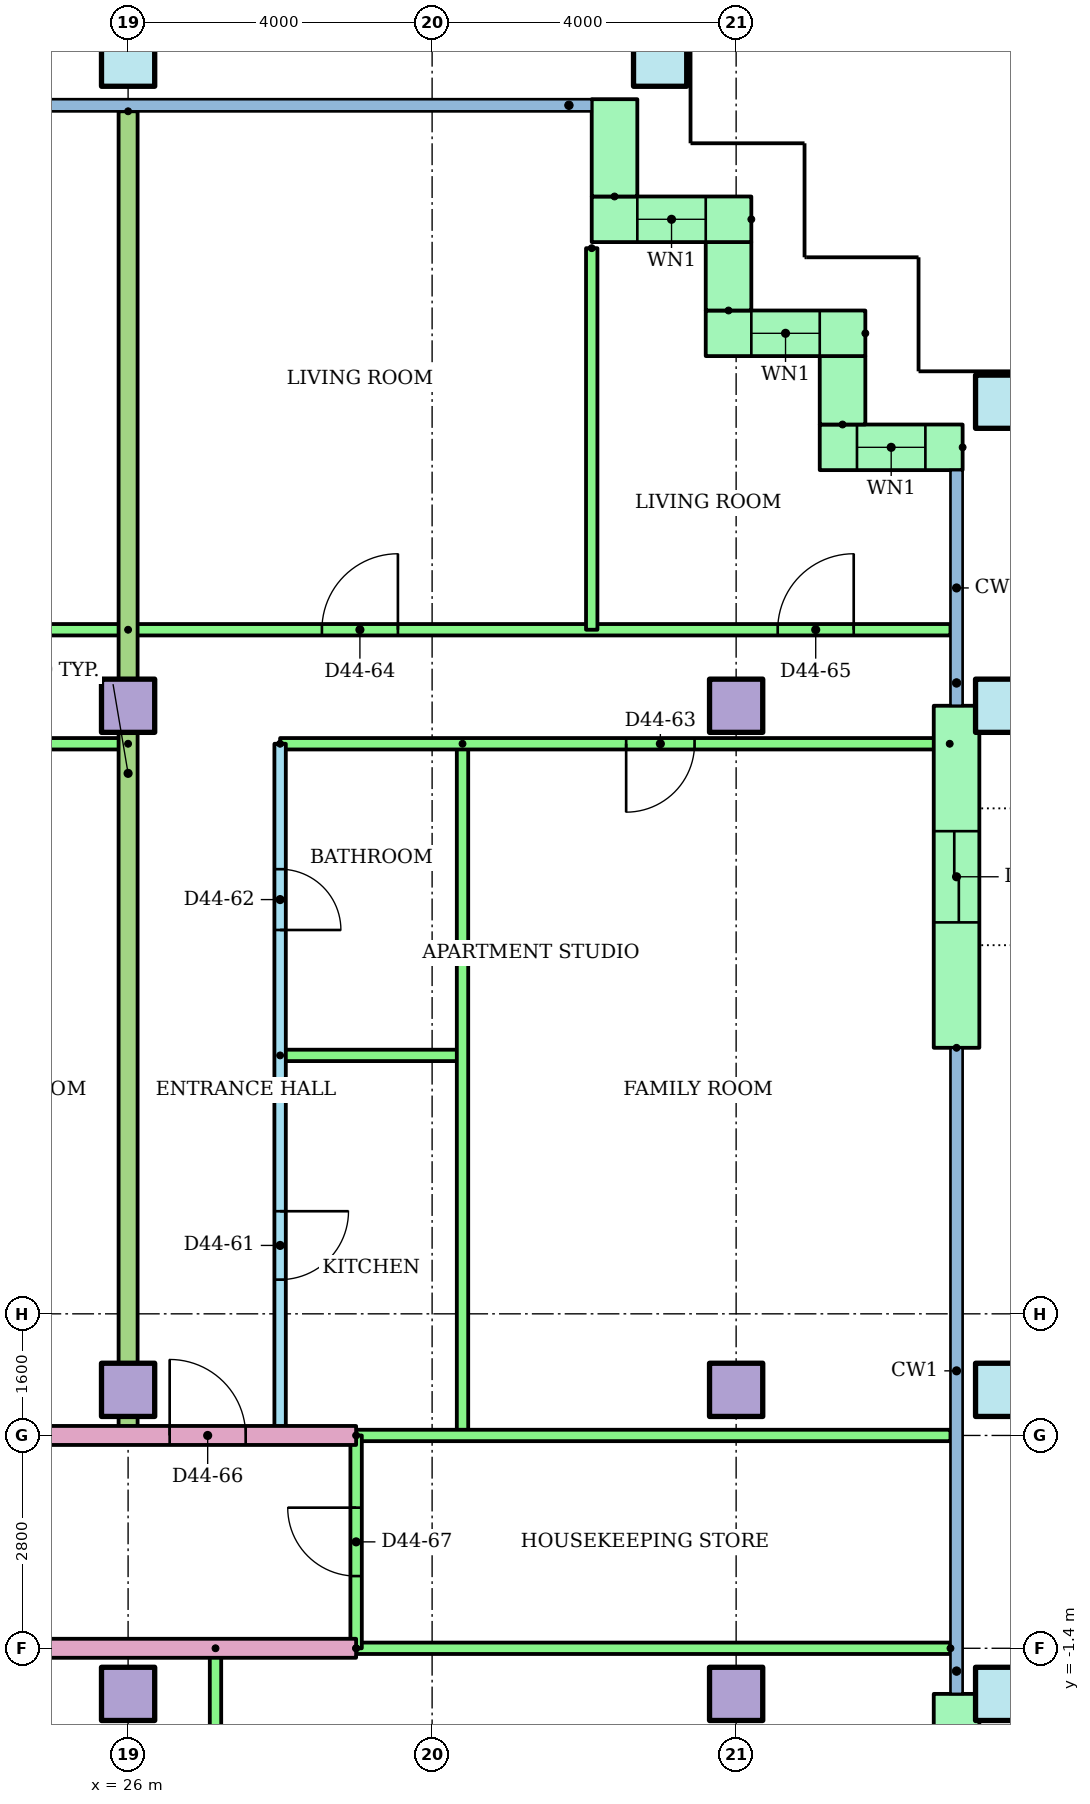
"""IFC4 building model, lengths in metres.
Left out: names, types, materials, properties, quantities, classifications, styles, units other than length and angle.
Written with IfcOpenShell. Run it as: python <this file> out.ifc"""

import sys

from ifc_helpers import new_model, si_unit, direction, frame, frame_2d, origin, origin_2d, place, context, subcontext, project, spatial, rectangle, hollow_rectangle, extrude, element, fill, save


model = new_model("IFC4")
c1 = context("Model", 3, precision=1e-05, world=origin(), true_north=direction((0.0, 1.0)))
c2 = subcontext(c1, "Body", "Model", "MODEL_VIEW")
j1 = project(units=[si_unit("LENGTHUNIT", "METRE"), si_unit("PLANEANGLEUNIT", "RADIAN")], contexts=[c1])
p1 = place(None, origin())
s1 = spatial("IfcSite", under=j1, at=p1, CompositionType="ELEMENT")
p2 = place(p1, origin())
s2 = spatial("IfcBuilding", under=s1, at=p2, CompositionType="ELEMENT")
p3 = place(p2, frame((0.0, 0.0, 171.7)))
s3 = spatial("IfcBuildingStorey", under=s2, at=p3, CompositionType="ELEMENT", Elevation=171.7)
for number, where in (
    (1, (26.0, -2.0, 0.0)),
    (2, (34.0, -2.0, 0.0)),
):
    element("IfcColumn", number, at=place(p3, frame(where)), inside=s3, PredefinedType="COLUMN", context=c2, shape_type="SweptSolid", body=[
        extrude(rectangle(XDim=0.7, YDim=0.7, at=origin_2d()), origin(), (0.0, 0.0, 1.0), 3.2),
    ])
p4 = place(p3, frame((37.5, -2.0, 0.0)))
e3 = element("IfcColumn", 3, at=p4, inside=s3, PredefinedType="COLUMN", context=c2, shape_type="SweptSolid", body=[
    extrude(hollow_rectangle(XDim=0.7, YDim=0.7, WallThickness=0.036, at=origin_2d()), origin(), (0.0, 0.0, 1.0), 3.2),
])
for number, where in (
    (4, (26.0, 2.0, 0.0)),
    (5, (34.0, 2.0, 0.0)),
):
    element("IfcColumn", number, at=place(p3, frame(where)), inside=s3, PredefinedType="COLUMN", context=c2, shape_type="SweptSolid", body=[
        extrude(rectangle(XDim=0.7, YDim=0.7, at=origin_2d()), origin(), (0.0, 0.0, 1.0), 3.2),
    ])
p5 = place(p3, frame((37.5, 2.0, 0.0)))
e6 = element("IfcColumn", 6, at=p5, inside=s3, PredefinedType="COLUMN", context=c2, shape_type="SweptSolid", body=[
    extrude(hollow_rectangle(XDim=0.7, YDim=0.7, WallThickness=0.036, at=origin_2d()), origin(), (0.0, 0.0, 1.0), 3.2),
])
for number, where in (
    (7, (26.0, 11.0, 0.0)),
    (8, (34.0, 11.0, 0.0)),
):
    element("IfcColumn", number, at=place(p3, frame(where)), inside=s3, PredefinedType="COLUMN", context=c2, shape_type="SweptSolid", body=[
        extrude(rectangle(XDim=0.7, YDim=0.7, at=origin_2d()), origin(), (0.0, 0.0, 1.0), 3.2),
    ])
for number, where in (
    (9, (37.5, 11.0, 0.0)),
    (10, (37.5, 15.0, 0.0)),
    (11, (26.0, 19.5, 0.0)),
    (12, (33.0, 19.5, 0.0)),
):
    element("IfcColumn", number, at=place(p3, frame(where)), inside=s3, PredefinedType="COLUMN", context=c2, shape_type="SweptSolid", body=[
        extrude(hollow_rectangle(XDim=0.7, YDim=0.7, WallThickness=0.036, at=origin_2d()), origin(), (0.0, 0.0, 1.0), 3.2),
    ])
p6 = place(p3, frame((36.98, 14.4, 0.0), z_axis=(0.0, 0.0, 1.0), x_axis=(-1.0, 0.0, 0.0)))
e13 = element("IfcWall", 13, at=p6, inside=s3, PredefinedType="STANDARD", context=c2, shape_type="SweptSolid", body=[
    extrude(rectangle(XDim=1.88, YDim=0.6, at=frame_2d((0.94, 0.0))), origin(), (0.0, 0.0, 1.0), 2.92),
])
p7 = place(p6, frame((0.49, 0.0, 0.9)))
e14 = element("IfcOpeningElement", 14, at=p7, cuts=e13, PredefinedType="OPENING", context=c2, shape_type="SweptSolid", body=[
    extrude(rectangle(XDim=0.9, YDim=1.5, at=frame_2d((0.45, 0.75))), frame((0.0, 0.31, 0.0), z_axis=(0.0, -1.0, 0.0), x_axis=(1.0, 0.0, 0.0)), (0.0, 0.0, 1.0), 0.62),
])
p8 = place(p3, frame((35.4, 14.7, 0.0), z_axis=(0.0, 0.0, 1.0), x_axis=(0.0, 1.0, 0.0)))
e15 = element("IfcWall", 15, at=p8, inside=s3, PredefinedType="STANDARD", context=c2, shape_type="SweptSolid", body=[
    extrude(rectangle(XDim=0.9, YDim=0.6, at=frame_2d((0.45, 0.0))), origin(), (0.0, 0.0, 1.0), 2.92),
])
p9 = place(p3, frame((35.7, 15.9, 0.0), z_axis=(0.0, 0.0, 1.0), x_axis=(-1.0, 0.0, 0.0)))
e16 = element("IfcWall", 16, at=p9, inside=s3, PredefinedType="STANDARD", context=c2, shape_type="SweptSolid", body=[
    extrude(rectangle(XDim=2.1, YDim=0.6, at=frame_2d((1.05, 0.0))), origin(), (0.0, 0.0, 1.0), 2.92),
])
p10 = place(p9, frame((0.6, 0.0, 0.9)))
e17 = element("IfcOpeningElement", 17, at=p10, cuts=e16, PredefinedType="OPENING", context=c2, shape_type="SweptSolid", body=[
    extrude(rectangle(XDim=0.9, YDim=1.5, at=frame_2d((0.45, 0.75))), frame((0.0, 0.31, 0.0), z_axis=(0.0, -1.0, 0.0), x_axis=(1.0, 0.0, 0.0)), (0.0, 0.0, 1.0), 0.62),
])
p11 = place(p3, frame((33.9, 16.2, 0.0), z_axis=(0.0, 0.0, 1.0), x_axis=(0.0, 1.0, 0.0)))
e18 = element("IfcWall", 18, at=p11, inside=s3, PredefinedType="STANDARD", context=c2, shape_type="SweptSolid", body=[
    extrude(rectangle(XDim=0.9, YDim=0.6, at=frame_2d((0.45, 0.0))), origin(), (0.0, 0.0, 1.0), 2.92),
])
p12 = place(p3, frame((34.2, 17.4, 0.0), z_axis=(0.0, 0.0, 1.0), x_axis=(-1.0, 0.0, 0.0)))
e19 = element("IfcWall", 19, at=p12, inside=s3, PredefinedType="STANDARD", context=c2, shape_type="SweptSolid", body=[
    extrude(rectangle(XDim=2.1, YDim=0.6, at=frame_2d((1.05, 0.0))), origin(), (0.0, 0.0, 1.0), 2.92),
])
p13 = place(p12, frame((0.6, 0.0, 0.9)))
e20 = element("IfcOpeningElement", 20, at=p13, cuts=e19, PredefinedType="OPENING", context=c2, shape_type="SweptSolid", body=[
    extrude(rectangle(XDim=0.9, YDim=1.5, at=frame_2d((0.45, 0.75))), frame((0.0, 0.31, 0.0), z_axis=(0.0, -1.0, 0.0), x_axis=(1.0, 0.0, 0.0)), (0.0, 0.0, 1.0), 0.62),
])
p14 = place(p3, frame((32.4, 17.7, 0.0), z_axis=(0.0, 0.0, 1.0), x_axis=(0.0, 1.0, 0.0)))
e21 = element("IfcWall", 21, at=p14, inside=s3, PredefinedType="STANDARD", context=c2, shape_type="SweptSolid", body=[
    extrude(rectangle(XDim=1.28, YDim=0.6, at=frame_2d((0.64, 0.0))), origin(), (0.0, 0.0, 1.0), 2.92),
])
p15 = place(p3, frame((36.9, -5.7, 0.0), z_axis=(0.0, 0.0, 1.0), x_axis=(0.0, 1.0, 0.0)))
e22 = element("IfcWall", 22, at=p15, inside=s3, PredefinedType="STANDARD", context=c2, shape_type="SweptSolid", body=[
    extrude(rectangle(XDim=3.7, YDim=0.6, at=frame_2d((1.85, 0.0))), origin(), (0.0, 0.0, 1.0), 2.92),
])
p16 = place(p15, frame((1.25, 0.0, 0.0)))
e23 = element("IfcOpeningElement", 23, at=p16, cuts=e22, PredefinedType="OPENING", context=c2, shape_type="SweptSolid", body=[
    extrude(rectangle(XDim=1.2, YDim=2.1, at=frame_2d((0.6, 1.05))), frame((0.0, 0.31, 0.0), z_axis=(0.0, -1.0, 0.0), x_axis=(1.0, 0.0, 0.0)), (0.0, 0.0, 1.0), 0.62),
])
p17 = place(p3, frame((36.9, 6.5, 0.0), z_axis=(0.0, 0.0, 1.0), x_axis=(0.0, 1.0, 0.0)))
e24 = element("IfcWall", 24, at=p17, inside=s3, PredefinedType="STANDARD", context=c2, shape_type="SweptSolid", body=[
    extrude(rectangle(XDim=4.5, YDim=0.6, at=frame_2d((2.25, 0.0))), origin(), (0.0, 0.0, 1.0), 2.92),
])
p18 = place(p17, frame((1.65, 0.0, 0.0)))
e25 = element("IfcOpeningElement", 25, at=p18, cuts=e24, PredefinedType="OPENING", context=c2, shape_type="SweptSolid", body=[
    extrude(rectangle(XDim=1.2, YDim=2.1, at=frame_2d((0.6, 1.05))), frame((0.0, 0.31, 0.0), z_axis=(0.0, -1.0, 0.0), x_axis=(1.0, 0.0, 0.0)), (0.0, 0.0, 1.0), 0.62),
])
p19 = place(p3, frame((27.15, -1.4, 0.0), z_axis=(0.0, 0.0, 1.0), x_axis=(0.0, -1.0, 0.0)))
e26 = element("IfcWall", 26, at=p19, inside=s3, PredefinedType="PARTITIONING", context=c2, shape_type="SweptSolid", body=[
    extrude(rectangle(XDim=6.7, YDim=0.15, at=frame_2d((3.35, 0.0))), origin(), (0.0, 0.0, 1.0), 2.4),
])
p20 = place(p3, frame((29.0, -1.4, 0.0), z_axis=(0.0, 0.0, 1.0), x_axis=(-1.0, 0.0, 0.0)))
e27 = element("IfcWall", 27, at=p20, inside=s3, PredefinedType="PARTITIONING", context=c2, shape_type="SweptSolid", body=[
    extrude(rectangle(XDim=15.0, YDim=0.25, at=frame_2d((7.5, 0.0))), origin(), (0.0, 0.0, 1.0), 2.4),
])
p21 = place(p3, frame((36.82, -1.4, 0.0), z_axis=(0.0, 0.0, 1.0), x_axis=(-1.0, 0.0, 0.0)))
e28 = element("IfcWall", 28, at=p21, inside=s3, PredefinedType="PARTITIONING", context=c2, shape_type="SweptSolid", body=[
    extrude(rectangle(XDim=7.82, YDim=0.15, at=frame_2d((3.91, 0.0))), origin(), (0.0, 0.0, 1.0), 2.4),
])
p22 = place(p3, frame((26.0, 10.5, 0.0), z_axis=(0.0, 0.0, 1.0), x_axis=(-1.0, 0.0, 0.0)))
e29 = element("IfcWall", 29, at=p22, inside=s3, PredefinedType="PARTITIONING", context=c2, shape_type="SweptSolid", body=[
    extrude(rectangle(XDim=10.0, YDim=0.15, at=frame_2d((5.0, 0.0))), origin(), (0.0, 0.0, 1.0), 2.4),
])
p23 = place(p22, frame((4.9, 0.0, 0.0)))
e30 = element("IfcOpeningElement", 30, at=p23, cuts=e29, PredefinedType="OPENING", context=c2, shape_type="SweptSolid", body=[
    extrude(rectangle(XDim=0.9, YDim=2.1, at=frame_2d((0.45, 1.05))), frame((0.0, 0.085, 0.0), z_axis=(0.0, -1.0, 0.0), x_axis=(1.0, 0.0, 0.0)), (0.0, 0.0, 1.0), 0.17),
])
p24 = place(p22, frame((1.1, 0.0, 0.0)))
e31 = element("IfcOpeningElement", 31, at=p24, cuts=e29, PredefinedType="OPENING", context=c2, shape_type="SweptSolid", body=[
    extrude(rectangle(XDim=0.9, YDim=2.1, at=frame_2d((0.45, 1.05))), frame((0.0, 0.085, 0.0), z_axis=(0.0, -1.0, 0.0), x_axis=(1.0, 0.0, 0.0)), (0.0, 0.0, 1.0), 0.17),
])
p25 = place(p3, frame((14.0, 12.0, 0.0)))
e32 = element("IfcWall", 32, at=p25, inside=s3, PredefinedType="PARTITIONING", context=c2, shape_type="SweptSolid", body=[
    extrude(rectangle(XDim=12.0, YDim=0.15, at=frame_2d((6.0, 0.0))), origin(), (0.0, 0.0, 1.0), 2.4),
])
p26 = place(p25, frame((1.5, 0.0, 0.0)))
e33 = element("IfcOpeningElement", 33, at=p26, cuts=e32, PredefinedType="OPENING", context=c2, shape_type="SweptSolid", body=[
    extrude(rectangle(XDim=1.0, YDim=2.1, at=frame_2d((0.5, 1.05))), frame((0.0, 0.085, 0.0), z_axis=(0.0, -1.0, 0.0), x_axis=(1.0, 0.0, 0.0)), (0.0, 0.0, 1.0), 0.17),
])
p27 = place(p25, frame((7.55, 0.0, 0.0)))
e34 = element("IfcOpeningElement", 34, at=p27, cuts=e32, PredefinedType="OPENING", context=c2, shape_type="SweptSolid", body=[
    extrude(rectangle(XDim=0.9, YDim=2.1, at=frame_2d((0.45, 1.05))), frame((0.0, 0.085, 0.0), z_axis=(0.0, -1.0, 0.0), x_axis=(1.0, 0.0, 0.0)), (0.0, 0.0, 1.0), 0.17),
])
p28 = place(p3, frame((28.0, 10.5, 0.0), z_axis=(0.0, 0.0, 1.0), x_axis=(0.0, -1.0, 0.0)))
e35 = element("IfcWall", 35, at=p28, inside=s3, PredefinedType="PARTITIONING", context=c2, shape_type="SweptSolid", body=[
    extrude(rectangle(XDim=9.1, YDim=0.15, at=frame_2d((4.55, 0.0))), origin(), (0.0, 0.0, 1.0), 2.4),
])
p29 = place(p28, frame((6.15, 0.0, 0.0)))
e36 = element("IfcOpeningElement", 36, at=p29, cuts=e35, PredefinedType="OPENING", context=c2, shape_type="SweptSolid", body=[
    extrude(rectangle(XDim=0.9, YDim=2.1, at=frame_2d((0.45, 1.05))), frame((0.0, 0.085, 0.0), z_axis=(0.0, -1.0, 0.0), x_axis=(1.0, 0.0, 0.0)), (0.0, 0.0, 1.0), 0.17),
])
p30 = place(p28, frame((1.65, 0.0, 0.0)))
e37 = element("IfcOpeningElement", 37, at=p30, cuts=e35, PredefinedType="OPENING", context=c2, shape_type="SweptSolid", body=[
    extrude(rectangle(XDim=0.8, YDim=2.1, at=frame_2d((0.4, 1.05))), frame((0.0, 0.085, 0.0), z_axis=(0.0, -1.0, 0.0), x_axis=(1.0, 0.0, 0.0)), (0.0, 0.0, 1.0), 0.17),
])
p31 = place(p3, frame((28.0, 6.4, 0.0)))
e38 = element("IfcWall", 38, at=p31, inside=s3, PredefinedType="PARTITIONING", context=c2, shape_type="SweptSolid", body=[
    extrude(rectangle(XDim=2.4, YDim=0.15, at=frame_2d((1.2, 0.0))), origin(), (0.0, 0.0, 1.0), 2.4),
])
p32 = place(p3, frame((30.4, 10.5, 0.0), z_axis=(0.0, 0.0, 1.0), x_axis=(0.0, -1.0, 0.0)))
e39 = element("IfcWall", 39, at=p32, inside=s3, PredefinedType="PARTITIONING", context=c2, shape_type="SweptSolid", body=[
    extrude(rectangle(XDim=9.1, YDim=0.15, at=frame_2d((4.55, 0.0))), origin(), (0.0, 0.0, 1.0), 2.4),
])
p33 = place(p3, frame((36.81, 10.5, 0.0), z_axis=(0.0, 0.0, 1.0), x_axis=(-1.0, 0.0, 0.0)))
e40 = element("IfcWall", 40, at=p33, inside=s3, PredefinedType="PARTITIONING", context=c2, shape_type="SweptSolid", body=[
    extrude(rectangle(XDim=8.81, YDim=0.15, at=frame_2d((4.405, 0.0))), origin(), (0.0, 0.0, 1.0), 2.4),
])
p34 = place(p33, frame((3.357, 0.0, 0.0)))
e41 = element("IfcOpeningElement", 41, at=p34, cuts=e40, PredefinedType="OPENING", context=c2, shape_type="SweptSolid", body=[
    extrude(rectangle(XDim=0.9, YDim=2.1, at=frame_2d((0.45, 1.05))), frame((0.0, 0.085, 0.0), z_axis=(0.0, -1.0, 0.0), x_axis=(1.0, 0.0, 0.0)), (0.0, 0.0, 1.0), 0.17),
])
p35 = place(p3, frame((26.0, 12.0, 0.0)))
e42 = element("IfcWall", 42, at=p35, inside=s3, PredefinedType="PARTITIONING", context=c2, shape_type="SweptSolid", body=[
    extrude(rectangle(XDim=10.82, YDim=0.15, at=frame_2d((5.41, 0.0))), origin(), (0.0, 0.0, 1.0), 2.4),
])
p36 = place(p35, frame((2.55, 0.0, 0.0)))
e43 = element("IfcOpeningElement", 43, at=p36, cuts=e42, PredefinedType="OPENING", context=c2, shape_type="SweptSolid", body=[
    extrude(rectangle(XDim=1.0, YDim=2.1, at=frame_2d((0.5, 1.05))), frame((0.0, 0.085, 0.0), z_axis=(0.0, -1.0, 0.0), x_axis=(1.0, 0.0, 0.0)), (0.0, 0.0, 1.0), 0.17),
])
p37 = place(p35, frame((8.547, 0.0, 0.0)))
e44 = element("IfcOpeningElement", 44, at=p37, cuts=e42, PredefinedType="OPENING", context=c2, shape_type="SweptSolid", body=[
    extrude(rectangle(XDim=1.0, YDim=2.1, at=frame_2d((0.5, 1.05))), frame((0.0, 0.085, 0.0), z_axis=(0.0, -1.0, 0.0), x_axis=(1.0, 0.0, 0.0)), (0.0, 0.0, 1.0), 0.17),
])
p38 = place(p3, frame((32.1, 17.02, 0.0), z_axis=(0.0, 0.0, 1.0), x_axis=(0.0, -1.0, 0.0)))
e45 = element("IfcWall", 45, at=p38, inside=s3, PredefinedType="PARTITIONING", context=c2, shape_type="SweptSolid", body=[
    extrude(rectangle(XDim=5.02, YDim=0.15, at=frame_2d((2.51, 0.0))), origin(), (0.0, 0.0, 1.0), 2.4),
])
p39 = place(p3, frame((26.0, 18.821, 0.0), z_axis=(0.0, 0.0, 1.0), x_axis=(0.0, -1.0, 0.0)))
e46 = element("IfcWall", 46, at=p39, inside=s3, PredefinedType="PARTITIONING", context=c2, shape_type="SweptSolid", body=[
    extrude(rectangle(XDim=17.421, YDim=0.25, at=frame_2d((8.71, 0.0))), origin(), (0.0, 0.0, 1.0), 2.4),
])
p40 = place(p3, frame((14.0, 1.4, 0.0)))
e47 = element("IfcWall", 47, at=p40, inside=s3, PredefinedType="PARTITIONING", context=c2, shape_type="SweptSolid", body=[
    extrude(rectangle(XDim=15.0, YDim=0.25, at=frame_2d((7.5, 0.0))), origin(), (0.0, 0.0, 1.0), 2.4),
])
p41 = place(p40, frame((0.5, 0.0, 0.0)))
e48 = element("IfcOpeningElement", 48, at=p41, cuts=e47, PredefinedType="OPENING", context=c2, shape_type="SweptSolid", body=[
    extrude(rectangle(XDim=1.0, YDim=2.1, at=frame_2d((0.5, 1.05))), frame((0.0, 0.135, 0.0), z_axis=(0.0, -1.0, 0.0), x_axis=(1.0, 0.0, 0.0)), (0.0, 0.0, 1.0), 0.27),
])
p42 = place(p40, frame((12.547, 0.0, 0.0)))
e49 = element("IfcOpeningElement", 49, at=p42, cuts=e47, PredefinedType="OPENING", context=c2, shape_type="SweptSolid", body=[
    extrude(rectangle(XDim=1.0, YDim=2.1, at=frame_2d((0.5, 1.05))), frame((0.0, 0.135, 0.0), z_axis=(0.0, -1.0, 0.0), x_axis=(1.0, 0.0, 0.0)), (0.0, 0.0, 1.0), 0.27),
])
p43 = place(p3, frame((29.0, 1.4, 0.0)))
e50 = element("IfcWall", 50, at=p43, inside=s3, PredefinedType="PARTITIONING", context=c2, shape_type="SweptSolid", body=[
    extrude(rectangle(XDim=7.82, YDim=0.15, at=frame_2d((3.91, 0.0))), origin(), (0.0, 0.0, 1.0), 2.4),
])
p44 = place(p3, frame((29.0, -1.4, 0.0), z_axis=(0.0, 0.0, 1.0), x_axis=(0.0, 1.0, 0.0)))
e51 = element("IfcWall", 51, at=p44, inside=s3, PredefinedType="PARTITIONING", context=c2, shape_type="SweptSolid", body=[
    extrude(rectangle(XDim=2.8, YDim=0.15, at=frame_2d((1.4, 0.0))), origin(), (0.0, 0.0, 1.0), 2.4),
])
p45 = place(p44, frame((0.95, 0.0, 0.0)))
e52 = element("IfcOpeningElement", 52, at=p45, cuts=e51, PredefinedType="OPENING", context=c2, shape_type="SweptSolid", body=[
    extrude(rectangle(XDim=0.9, YDim=2.1, at=frame_2d((0.45, 1.05))), frame((0.0, 0.085, 0.0), z_axis=(0.0, -1.0, 0.0), x_axis=(1.0, 0.0, 0.0)), (0.0, 0.0, 1.0), 0.17),
])
p46 = place(p7, origin())
e53 = element("IfcWindow", 53, at=p46, inside=s3, PartitioningType="SINGLE_PANEL", PredefinedType="WINDOW", context=c2, shape_type="SweptSolid", body=[
    extrude(rectangle(XDim=0.9, YDim=1.5, at=frame_2d((0.45, 0.75))), frame((0.0, 0.03, 0.0), z_axis=(0.0, -1.0, 0.0), x_axis=(1.0, 0.0, 0.0)), (0.0, 0.0, 1.0), 0.06),
])
fill(e14, e53)
p47 = place(p10, origin())
e54 = element("IfcWindow", 54, at=p47, inside=s3, PartitioningType="SINGLE_PANEL", PredefinedType="WINDOW", context=c2, shape_type="SweptSolid", body=[
    extrude(rectangle(XDim=0.9, YDim=1.5, at=frame_2d((0.45, 0.75))), frame((0.0, 0.03, 0.0), z_axis=(0.0, -1.0, 0.0), x_axis=(1.0, 0.0, 0.0)), (0.0, 0.0, 1.0), 0.06),
])
fill(e17, e54)
p48 = place(p13, origin())
e55 = element("IfcWindow", 55, at=p48, inside=s3, PartitioningType="SINGLE_PANEL", PredefinedType="WINDOW", context=c2, shape_type="SweptSolid", body=[
    extrude(rectangle(XDim=0.9, YDim=1.5, at=frame_2d((0.45, 0.75))), frame((0.0, 0.03, 0.0), z_axis=(0.0, -1.0, 0.0), x_axis=(1.0, 0.0, 0.0)), (0.0, 0.0, 1.0), 0.06),
])
fill(e20, e55)
p49 = place(p29, origin())
e56 = element("IfcDoor", 56, at=p49, inside=s3, OperationType="SINGLE_SWING_LEFT", PredefinedType="DOOR", context=c2, shape_type="SweptSolid", body=[
    extrude(rectangle(XDim=0.9, YDim=2.1, at=frame_2d((0.45, 1.05))), frame((0.0, 0.025, 0.0), z_axis=(0.0, -1.0, 0.0), x_axis=(1.0, 0.0, 0.0)), (0.0, 0.0, 1.0), 0.05),
])
fill(e36, e56)
p50 = place(p30, origin())
e57 = element("IfcDoor", 57, at=p50, inside=s3, OperationType="SINGLE_SWING_RIGHT", PredefinedType="DOOR", context=c2, shape_type="SweptSolid", body=[
    extrude(rectangle(XDim=0.8, YDim=2.1, at=frame_2d((0.4, 1.05))), frame((0.0, 0.025, 0.0), z_axis=(0.0, -1.0, 0.0), x_axis=(1.0, 0.0, 0.0)), (0.0, 0.0, 1.0), 0.05),
])
fill(e37, e57)
p51 = place(p34, origin())
e58 = element("IfcDoor", 58, at=p51, inside=s3, OperationType="SINGLE_SWING_RIGHT", PredefinedType="DOOR", context=c2, shape_type="SweptSolid", body=[
    extrude(rectangle(XDim=0.9, YDim=2.1, at=frame_2d((0.45, 1.05))), frame((0.0, 0.025, 0.0), z_axis=(0.0, -1.0, 0.0), x_axis=(1.0, 0.0, 0.0)), (0.0, 0.0, 1.0), 0.05),
])
fill(e41, e58)
p52 = place(p36, origin())
e59 = element("IfcDoor", 59, at=p52, inside=s3, OperationType="SINGLE_SWING_RIGHT", PredefinedType="DOOR", context=c2, shape_type="SweptSolid", body=[
    extrude(rectangle(XDim=1.0, YDim=2.1, at=frame_2d((0.5, 1.05))), frame((0.0, 0.025, 0.0), z_axis=(0.0, -1.0, 0.0), x_axis=(1.0, 0.0, 0.0)), (0.0, 0.0, 1.0), 0.05),
])
fill(e43, e59)
p53 = place(p37, origin())
e60 = element("IfcDoor", 60, at=p53, inside=s3, OperationType="SINGLE_SWING_RIGHT", PredefinedType="DOOR", context=c2, shape_type="SweptSolid", body=[
    extrude(rectangle(XDim=1.0, YDim=2.1, at=frame_2d((0.5, 1.05))), frame((0.0, 0.025, 0.0), z_axis=(0.0, -1.0, 0.0), x_axis=(1.0, 0.0, 0.0)), (0.0, 0.0, 1.0), 0.05),
])
fill(e44, e60)
p54 = place(p42, origin())
e61 = element("IfcDoor", 61, at=p54, inside=s3, OperationType="SINGLE_SWING_LEFT", PredefinedType="DOOR", context=c2, shape_type="SweptSolid", body=[
    extrude(rectangle(XDim=1.0, YDim=2.1, at=frame_2d((0.5, 1.05))), frame((0.0, 0.025, 0.0), z_axis=(0.0, -1.0, 0.0), x_axis=(1.0, 0.0, 0.0)), (0.0, 0.0, 1.0), 0.05),
])
fill(e49, e61)
p55 = place(p45, origin())
e62 = element("IfcDoor", 62, at=p55, inside=s3, OperationType="SINGLE_SWING_RIGHT", PredefinedType="DOOR", context=c2, shape_type="SweptSolid", body=[
    extrude(rectangle(XDim=0.9, YDim=2.1, at=frame_2d((0.45, 1.05))), frame((0.0, 0.025, 0.0), z_axis=(0.0, -1.0, 0.0), x_axis=(1.0, 0.0, 0.0)), (0.0, 0.0, 1.0), 0.05),
])
fill(e52, e62)
p56 = place(p18, origin())
e63 = element("IfcDoor", 63, at=p56, inside=s3, OperationType="SLIDING_TO_LEFT", PredefinedType="DOOR", context=c2, shape_type="SweptSolid", body=[
    extrude(rectangle(XDim=1.2, YDim=2.1, at=frame_2d((0.6, 1.05))), frame((0.0, 0.025, 0.0), z_axis=(0.0, -1.0, 0.0), x_axis=(1.0, 0.0, 0.0)), (0.0, 0.0, 1.0), 0.05),
])
fill(e25, e63)
save(model, sys.argv[1])
